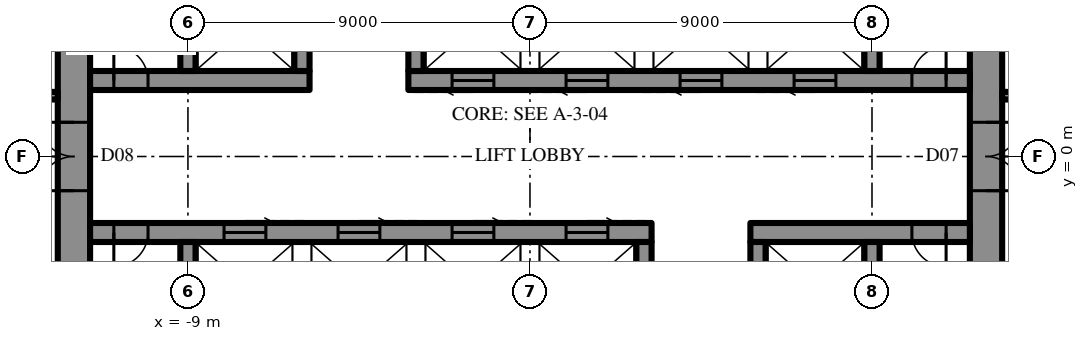
"""IFC4 building model, lengths in metres.
Left out: names, types, materials, properties, quantities, classifications, styles, units other than length and angle.
Written with IfcOpenShell. Run it as: python <this file> out.ifc"""

import sys

from ifc_helpers import new_model, si_unit, direction, frame, frame_2d, origin, place, context, subcontext, project, spatial, rectangle, extrude, element, fill, save


model = new_model("IFC4")
c1 = context("Model", 3, precision=1e-05, world=origin(), true_north=direction((0.0, 1.0)))
c2 = subcontext(c1, "Body", "Model", "MODEL_VIEW")
j1 = project(units=[si_unit("LENGTHUNIT", "METRE"), si_unit("PLANEANGLEUNIT", "RADIAN")], contexts=[c1])
p1 = place(None, origin())
s1 = spatial("IfcSite", under=j1, at=p1, CompositionType="ELEMENT")
p2 = place(p1, origin())
s2 = spatial("IfcBuilding", under=s1, at=p2, CompositionType="ELEMENT")
p3 = place(p2, frame((0.0, 0.0, 319.9)))
s3 = spatial("IfcBuildingStorey", under=s2, at=p3, CompositionType="ELEMENT", Elevation=319.9)
p4 = place(p3, frame((12.0, -10.7, 0.0), z_axis=(0.0, 0.0, 1.0), x_axis=(0.0, 1.0, 0.0)))
e1 = element("IfcWall", 1, at=p4, inside=s3, PredefinedType="SHEAR", context=c2, shape_type="SweptSolid", body=[
    extrude(rectangle(XDim=21.4, YDim=0.85, at=frame_2d((10.7, 0.0))), origin(), (0.0, 0.0, 1.0), 4.2),
])
p5 = place(p4, frame((9.8, 0.0, 0.0)))
e2 = element("IfcOpeningElement", 2, at=p5, cuts=e1, PredefinedType="OPENING", context=c2, shape_type="SweptSolid", body=[
    extrude(rectangle(XDim=1.8, YDim=2.4, at=frame_2d((0.9, 1.2))), frame((0.0, 0.435, 0.0), z_axis=(0.0, -1.0, 0.0), x_axis=(1.0, 0.0, 0.0)), (0.0, 0.0, 1.0), 0.87),
])
p6 = place(p3, frame((-12.0, 10.7, 0.0), z_axis=(0.0, 0.0, 1.0), x_axis=(0.0, -1.0, 0.0)))
e3 = element("IfcWall", 3, at=p6, inside=s3, PredefinedType="SHEAR", context=c2, shape_type="SweptSolid", body=[
    extrude(rectangle(XDim=21.4, YDim=0.85, at=frame_2d((10.7, 0.0))), origin(), (0.0, 0.0, 1.0), 4.2),
])
p7 = place(p6, frame((9.8, 0.0, 0.0)))
e4 = element("IfcOpeningElement", 4, at=p7, cuts=e3, PredefinedType="OPENING", context=c2, shape_type="SweptSolid", body=[
    extrude(rectangle(XDim=1.8, YDim=2.4, at=frame_2d((0.9, 1.2))), frame((0.0, 0.435, 0.0), z_axis=(0.0, -1.0, 0.0), x_axis=(1.0, 0.0, 0.0)), (0.0, 0.0, 1.0), 0.87),
])
p8 = place(p3, frame((-11.575, 2.0, 0.0), z_axis=(0.0, 0.0, 1.0), x_axis=(1.0, 0.0, 0.0)))
e5 = element("IfcWall", 5, at=p8, inside=s3, PredefinedType="SHEAR", context=c2, shape_type="SweptSolid", body=[
    extrude(rectangle(XDim=5.775, YDim=0.5, at=frame_2d((2.887, 0.0))), origin(), (0.0, 0.0, 1.0), 4.2),
])
p9 = place(p8, frame((0.625, 0.0, 0.0)))
e6 = element("IfcOpeningElement", 6, at=p9, cuts=e5, PredefinedType="OPENING", context=c2, shape_type="SweptSolid", body=[
    extrude(rectangle(XDim=0.9, YDim=2.2, at=frame_2d((0.45, 1.1))), frame((0.0, 0.26, 0.0), z_axis=(0.0, -1.0, 0.0), x_axis=(1.0, 0.0, 0.0)), (0.0, 0.0, 1.0), 0.52),
])
p10 = place(p3, frame((-3.2, 2.0, 0.0), z_axis=(0.0, 0.0, 1.0), x_axis=(1.0, 0.0, 0.0)))
e7 = element("IfcWall", 7, at=p10, inside=s3, PredefinedType="SHEAR", context=c2, shape_type="SweptSolid", body=[
    extrude(rectangle(XDim=14.775, YDim=0.5, at=frame_2d((7.387, 0.0))), origin(), (0.0, 0.0, 1.0), 4.2),
])
p11 = place(p10, frame((13.25, 0.0, 0.0)))
e8 = element("IfcOpeningElement", 8, at=p11, cuts=e7, PredefinedType="OPENING", context=c2, shape_type="SweptSolid", body=[
    extrude(rectangle(XDim=0.9, YDim=2.2, at=frame_2d((0.45, 1.1))), frame((0.0, 0.26, 0.0), z_axis=(0.0, -1.0, 0.0), x_axis=(1.0, 0.0, 0.0)), (0.0, 0.0, 1.0), 0.52),
])
p12 = place(p10, frame((1.15, 0.0, 0.0)))
e9 = element("IfcOpeningElement", 9, at=p12, cuts=e7, PredefinedType="OPENING", context=c2, shape_type="SweptSolid", body=[
    extrude(rectangle(XDim=1.1, YDim=2.2, at=frame_2d((0.55, 1.1))), frame((0.0, 0.26, 0.0), z_axis=(0.0, -1.0, 0.0), x_axis=(1.0, 0.0, 0.0)), (0.0, 0.0, 1.0), 0.52),
])
p13 = place(p10, frame((4.15, 0.0, 0.0)))
e10 = element("IfcOpeningElement", 10, at=p13, cuts=e7, PredefinedType="OPENING", context=c2, shape_type="SweptSolid", body=[
    extrude(rectangle(XDim=1.1, YDim=2.2, at=frame_2d((0.55, 1.1))), frame((0.0, 0.26, 0.0), z_axis=(0.0, -1.0, 0.0), x_axis=(1.0, 0.0, 0.0)), (0.0, 0.0, 1.0), 0.52),
])
p14 = place(p10, frame((7.15, 0.0, 0.0)))
e11 = element("IfcOpeningElement", 11, at=p14, cuts=e7, PredefinedType="OPENING", context=c2, shape_type="SweptSolid", body=[
    extrude(rectangle(XDim=1.1, YDim=2.2, at=frame_2d((0.55, 1.1))), frame((0.0, 0.26, 0.0), z_axis=(0.0, -1.0, 0.0), x_axis=(1.0, 0.0, 0.0)), (0.0, 0.0, 1.0), 0.52),
])
p15 = place(p10, frame((10.15, 0.0, 0.0)))
e12 = element("IfcOpeningElement", 12, at=p15, cuts=e7, PredefinedType="OPENING", context=c2, shape_type="SweptSolid", body=[
    extrude(rectangle(XDim=1.1, YDim=2.2, at=frame_2d((0.55, 1.1))), frame((0.0, 0.26, 0.0), z_axis=(0.0, -1.0, 0.0), x_axis=(1.0, 0.0, 0.0)), (0.0, 0.0, 1.0), 0.52),
])
for number, where, z_axis, x_axis in (
    (13, (-9.0, 2.25, 0.0), (0.0, 0.0, 1.0), (0.0, 1.0, 0.0)),
    (14, (-6.0, 2.25, 0.0), (0.0, 0.0, 1.0), (0.0, 1.0, 0.0)),
    (15, (-3.0, 2.25, 0.0), (0.0, 0.0, 1.0), (0.0, 1.0, 0.0)),
    (16, (9.0, 2.25, 0.0), (0.0, 0.0, 1.0), (0.0, 1.0, 0.0)),
):
    element("IfcWall", number, at=place(p3, frame(where, z_axis=z_axis, x_axis=x_axis)), inside=s3, PredefinedType="SHEAR", context=c2, shape_type="SweptSolid", body=[
        extrude(rectangle(XDim=2.3, YDim=0.4, at=frame_2d((1.15, 0.0))), origin(), (0.0, 0.0, 1.0), 4.2),
    ])
p16 = place(p3, frame((11.575, -2.0, 0.0), z_axis=(0.0, 0.0, 1.0), x_axis=(-1.0, 0.0, 0.0)))
e17 = element("IfcWall", 17, at=p16, inside=s3, PredefinedType="SHEAR", context=c2, shape_type="SweptSolid", body=[
    extrude(rectangle(XDim=5.775, YDim=0.5, at=frame_2d((2.887, 0.0))), origin(), (0.0, 0.0, 1.0), 4.2),
])
p17 = place(p16, frame((0.625, 0.0, 0.0)))
e18 = element("IfcOpeningElement", 18, at=p17, cuts=e17, PredefinedType="OPENING", context=c2, shape_type="SweptSolid", body=[
    extrude(rectangle(XDim=0.9, YDim=2.2, at=frame_2d((0.45, 1.1))), frame((0.0, 0.26, 0.0), z_axis=(0.0, -1.0, 0.0), x_axis=(1.0, 0.0, 0.0)), (0.0, 0.0, 1.0), 0.52),
])
p18 = place(p3, frame((3.2, -2.0, 0.0), z_axis=(0.0, 0.0, 1.0), x_axis=(-1.0, 0.0, 0.0)))
e19 = element("IfcWall", 19, at=p18, inside=s3, PredefinedType="SHEAR", context=c2, shape_type="SweptSolid", body=[
    extrude(rectangle(XDim=14.775, YDim=0.5, at=frame_2d((7.387, 0.0))), origin(), (0.0, 0.0, 1.0), 4.2),
])
p19 = place(p18, frame((13.25, 0.0, 0.0)))
e20 = element("IfcOpeningElement", 20, at=p19, cuts=e19, PredefinedType="OPENING", context=c2, shape_type="SweptSolid", body=[
    extrude(rectangle(XDim=0.9, YDim=2.2, at=frame_2d((0.45, 1.1))), frame((0.0, 0.26, 0.0), z_axis=(0.0, -1.0, 0.0), x_axis=(1.0, 0.0, 0.0)), (0.0, 0.0, 1.0), 0.52),
])
p20 = place(p18, frame((1.15, 0.0, 0.0)))
e21 = element("IfcOpeningElement", 21, at=p20, cuts=e19, PredefinedType="OPENING", context=c2, shape_type="SweptSolid", body=[
    extrude(rectangle(XDim=1.1, YDim=2.2, at=frame_2d((0.55, 1.1))), frame((0.0, 0.26, 0.0), z_axis=(0.0, -1.0, 0.0), x_axis=(1.0, 0.0, 0.0)), (0.0, 0.0, 1.0), 0.52),
])
p21 = place(p18, frame((4.15, 0.0, 0.0)))
e22 = element("IfcOpeningElement", 22, at=p21, cuts=e19, PredefinedType="OPENING", context=c2, shape_type="SweptSolid", body=[
    extrude(rectangle(XDim=1.1, YDim=2.2, at=frame_2d((0.55, 1.1))), frame((0.0, 0.26, 0.0), z_axis=(0.0, -1.0, 0.0), x_axis=(1.0, 0.0, 0.0)), (0.0, 0.0, 1.0), 0.52),
])
p22 = place(p18, frame((7.15, 0.0, 0.0)))
e23 = element("IfcOpeningElement", 23, at=p22, cuts=e19, PredefinedType="OPENING", context=c2, shape_type="SweptSolid", body=[
    extrude(rectangle(XDim=1.1, YDim=2.2, at=frame_2d((0.55, 1.1))), frame((0.0, 0.26, 0.0), z_axis=(0.0, -1.0, 0.0), x_axis=(1.0, 0.0, 0.0)), (0.0, 0.0, 1.0), 0.52),
])
p23 = place(p18, frame((10.15, 0.0, 0.0)))
e24 = element("IfcOpeningElement", 24, at=p23, cuts=e19, PredefinedType="OPENING", context=c2, shape_type="SweptSolid", body=[
    extrude(rectangle(XDim=1.1, YDim=2.2, at=frame_2d((0.55, 1.1))), frame((0.0, 0.26, 0.0), z_axis=(0.0, -1.0, 0.0), x_axis=(1.0, 0.0, 0.0)), (0.0, 0.0, 1.0), 0.52),
])
for number, where, z_axis, x_axis in (
    (25, (9.0, -2.25, 0.0), (0.0, 0.0, 1.0), (0.0, -1.0, 0.0)),
    (26, (6.0, -2.25, 0.0), (0.0, 0.0, 1.0), (0.0, -1.0, 0.0)),
    (27, (3.0, -2.25, 0.0), (0.0, 0.0, 1.0), (0.0, -1.0, 0.0)),
    (28, (-9.0, -2.25, 0.0), (0.0, 0.0, 1.0), (0.0, -1.0, 0.0)),
):
    element("IfcWall", number, at=place(p3, frame(where, z_axis=z_axis, x_axis=x_axis)), inside=s3, PredefinedType="SHEAR", context=c2, shape_type="SweptSolid", body=[
        extrude(rectangle(XDim=2.3, YDim=0.4, at=frame_2d((1.15, 0.0))), origin(), (0.0, 0.0, 1.0), 4.2),
    ])
p24 = place(p3, frame((12.425, 1.6, 0.0), z_axis=(0.0, 0.0, 1.0), x_axis=(1.0, 0.0, 0.0)))
e29 = element("IfcWall", 29, at=p24, inside=s3, PredefinedType="PARTITIONING", context=c2, shape_type="SweptSolid", body=[
    extrude(rectangle(XDim=16.327, YDim=0.2, at=frame_2d((8.164, 0.0))), origin(), (0.0, 0.0, 1.0), 4.0),
])
p25 = place(p24, frame((1.133, 0.0, 0.0)))
e30 = element("IfcOpeningElement", 30, at=p25, cuts=e29, PredefinedType="OPENING", context=c2, shape_type="SweptSolid", body=[
    extrude(rectangle(XDim=1.0, YDim=2.2, at=frame_2d((0.5, 1.1))), frame((0.0, 0.11, 0.0), z_axis=(0.0, -1.0, 0.0), x_axis=(1.0, 0.0, 0.0)), (0.0, 0.0, 1.0), 0.22),
])
p26 = place(p3, frame((-12.425, 1.6, 0.0), z_axis=(0.0, 0.0, 1.0), x_axis=(-1.0, 0.0, 0.0)))
e31 = element("IfcWall", 31, at=p26, inside=s3, PredefinedType="PARTITIONING", context=c2, shape_type="SweptSolid", body=[
    extrude(rectangle(XDim=16.327, YDim=0.2, at=frame_2d((8.164, 0.0))), origin(), (0.0, 0.0, 1.0), 4.0),
])
p27 = place(p26, frame((1.133, 0.0, 0.0)))
e32 = element("IfcOpeningElement", 32, at=p27, cuts=e31, PredefinedType="OPENING", context=c2, shape_type="SweptSolid", body=[
    extrude(rectangle(XDim=1.0, YDim=2.2, at=frame_2d((0.5, 1.1))), frame((0.0, 0.11, 0.0), z_axis=(0.0, -1.0, 0.0), x_axis=(1.0, 0.0, 0.0)), (0.0, 0.0, 1.0), 0.22),
])
p28 = place(p5, frame((1.8, 0.0, 0.0), z_axis=(0.0, 0.0, 1.0), x_axis=(-1.0, 0.0, 0.0)))
e33 = element("IfcDoor", 33, at=p28, inside=s3, OperationType="DOUBLE_DOOR_SINGLE_SWING", PredefinedType="DOOR", context=c2, shape_type="SweptSolid", body=[
    extrude(rectangle(XDim=1.8, YDim=2.4, at=frame_2d((0.9, 1.2))), frame((0.0, 0.025, 0.0), z_axis=(0.0, -1.0, 0.0), x_axis=(1.0, 0.0, 0.0)), (0.0, 0.0, 1.0), 0.05),
])
fill(e2, e33)
p29 = place(p7, frame((1.8, 0.0, 0.0), z_axis=(0.0, 0.0, 1.0), x_axis=(-1.0, 0.0, 0.0)))
e34 = element("IfcDoor", 34, at=p29, inside=s3, OperationType="DOUBLE_DOOR_SINGLE_SWING", PredefinedType="DOOR", context=c2, shape_type="SweptSolid", body=[
    extrude(rectangle(XDim=1.8, YDim=2.4, at=frame_2d((0.9, 1.2))), frame((0.0, 0.025, 0.0), z_axis=(0.0, -1.0, 0.0), x_axis=(1.0, 0.0, 0.0)), (0.0, 0.0, 1.0), 0.05),
])
fill(e4, e34)
p30 = place(p9, origin())
e35 = element("IfcDoor", 35, at=p30, inside=s3, OperationType="SINGLE_SWING_RIGHT", PredefinedType="DOOR", context=c2, shape_type="SweptSolid", body=[
    extrude(rectangle(XDim=0.9, YDim=2.2, at=frame_2d((0.45, 1.1))), frame((0.0, 0.025, 0.0), z_axis=(0.0, -1.0, 0.0), x_axis=(1.0, 0.0, 0.0)), (0.0, 0.0, 1.0), 0.05),
])
fill(e6, e35)
p31 = place(p11, origin())
e36 = element("IfcDoor", 36, at=p31, inside=s3, OperationType="SINGLE_SWING_LEFT", PredefinedType="DOOR", context=c2, shape_type="SweptSolid", body=[
    extrude(rectangle(XDim=0.9, YDim=2.2, at=frame_2d((0.45, 1.1))), frame((0.0, 0.025, 0.0), z_axis=(0.0, -1.0, 0.0), x_axis=(1.0, 0.0, 0.0)), (0.0, 0.0, 1.0), 0.05),
])
fill(e8, e36)
p32 = place(p17, origin())
e37 = element("IfcDoor", 37, at=p32, inside=s3, OperationType="SINGLE_SWING_RIGHT", PredefinedType="DOOR", context=c2, shape_type="SweptSolid", body=[
    extrude(rectangle(XDim=0.9, YDim=2.2, at=frame_2d((0.45, 1.1))), frame((0.0, 0.025, 0.0), z_axis=(0.0, -1.0, 0.0), x_axis=(1.0, 0.0, 0.0)), (0.0, 0.0, 1.0), 0.05),
])
fill(e18, e37)
p33 = place(p19, origin())
e38 = element("IfcDoor", 38, at=p33, inside=s3, OperationType="SINGLE_SWING_LEFT", PredefinedType="DOOR", context=c2, shape_type="SweptSolid", body=[
    extrude(rectangle(XDim=0.9, YDim=2.2, at=frame_2d((0.45, 1.1))), frame((0.0, 0.025, 0.0), z_axis=(0.0, -1.0, 0.0), x_axis=(1.0, 0.0, 0.0)), (0.0, 0.0, 1.0), 0.05),
])
fill(e20, e38)
p34 = place(p12, frame((1.1, 0.0, 0.0), z_axis=(0.0, 0.0, 1.0), x_axis=(-1.0, 0.0, 0.0)))
e39 = element("IfcDoor", 39, at=p34, inside=s3, OperationType="SLIDING_TO_LEFT", PredefinedType="DOOR", context=c2, shape_type="SweptSolid", body=[
    extrude(rectangle(XDim=1.1, YDim=2.2, at=frame_2d((0.55, 1.1))), frame((0.0, 0.025, 0.0), z_axis=(0.0, -1.0, 0.0), x_axis=(1.0, 0.0, 0.0)), (0.0, 0.0, 1.0), 0.05),
])
fill(e9, e39)
p35 = place(p13, frame((1.1, 0.0, 0.0), z_axis=(0.0, 0.0, 1.0), x_axis=(-1.0, 0.0, 0.0)))
e40 = element("IfcDoor", 40, at=p35, inside=s3, OperationType="SLIDING_TO_LEFT", PredefinedType="DOOR", context=c2, shape_type="SweptSolid", body=[
    extrude(rectangle(XDim=1.1, YDim=2.2, at=frame_2d((0.55, 1.1))), frame((0.0, 0.025, 0.0), z_axis=(0.0, -1.0, 0.0), x_axis=(1.0, 0.0, 0.0)), (0.0, 0.0, 1.0), 0.05),
])
fill(e10, e40)
p36 = place(p14, frame((1.1, 0.0, 0.0), z_axis=(0.0, 0.0, 1.0), x_axis=(-1.0, 0.0, 0.0)))
e41 = element("IfcDoor", 41, at=p36, inside=s3, OperationType="SLIDING_TO_LEFT", PredefinedType="DOOR", context=c2, shape_type="SweptSolid", body=[
    extrude(rectangle(XDim=1.1, YDim=2.2, at=frame_2d((0.55, 1.1))), frame((0.0, 0.025, 0.0), z_axis=(0.0, -1.0, 0.0), x_axis=(1.0, 0.0, 0.0)), (0.0, 0.0, 1.0), 0.05),
])
fill(e11, e41)
p37 = place(p15, frame((1.1, 0.0, 0.0), z_axis=(0.0, 0.0, 1.0), x_axis=(-1.0, 0.0, 0.0)))
e42 = element("IfcDoor", 42, at=p37, inside=s3, OperationType="SLIDING_TO_LEFT", PredefinedType="DOOR", context=c2, shape_type="SweptSolid", body=[
    extrude(rectangle(XDim=1.1, YDim=2.2, at=frame_2d((0.55, 1.1))), frame((0.0, 0.025, 0.0), z_axis=(0.0, -1.0, 0.0), x_axis=(1.0, 0.0, 0.0)), (0.0, 0.0, 1.0), 0.05),
])
fill(e12, e42)
p38 = place(p20, frame((1.1, 0.0, 0.0), z_axis=(0.0, 0.0, 1.0), x_axis=(-1.0, 0.0, 0.0)))
e43 = element("IfcDoor", 43, at=p38, inside=s3, OperationType="SLIDING_TO_LEFT", PredefinedType="DOOR", context=c2, shape_type="SweptSolid", body=[
    extrude(rectangle(XDim=1.1, YDim=2.2, at=frame_2d((0.55, 1.1))), frame((0.0, 0.025, 0.0), z_axis=(0.0, -1.0, 0.0), x_axis=(1.0, 0.0, 0.0)), (0.0, 0.0, 1.0), 0.05),
])
fill(e21, e43)
p39 = place(p21, frame((1.1, 0.0, 0.0), z_axis=(0.0, 0.0, 1.0), x_axis=(-1.0, 0.0, 0.0)))
e44 = element("IfcDoor", 44, at=p39, inside=s3, OperationType="SLIDING_TO_LEFT", PredefinedType="DOOR", context=c2, shape_type="SweptSolid", body=[
    extrude(rectangle(XDim=1.1, YDim=2.2, at=frame_2d((0.55, 1.1))), frame((0.0, 0.025, 0.0), z_axis=(0.0, -1.0, 0.0), x_axis=(1.0, 0.0, 0.0)), (0.0, 0.0, 1.0), 0.05),
])
fill(e22, e44)
p40 = place(p22, frame((1.1, 0.0, 0.0), z_axis=(0.0, 0.0, 1.0), x_axis=(-1.0, 0.0, 0.0)))
e45 = element("IfcDoor", 45, at=p40, inside=s3, OperationType="SLIDING_TO_LEFT", PredefinedType="DOOR", context=c2, shape_type="SweptSolid", body=[
    extrude(rectangle(XDim=1.1, YDim=2.2, at=frame_2d((0.55, 1.1))), frame((0.0, 0.025, 0.0), z_axis=(0.0, -1.0, 0.0), x_axis=(1.0, 0.0, 0.0)), (0.0, 0.0, 1.0), 0.05),
])
fill(e23, e45)
p41 = place(p23, frame((1.1, 0.0, 0.0), z_axis=(0.0, 0.0, 1.0), x_axis=(-1.0, 0.0, 0.0)))
e46 = element("IfcDoor", 46, at=p41, inside=s3, OperationType="SLIDING_TO_LEFT", PredefinedType="DOOR", context=c2, shape_type="SweptSolid", body=[
    extrude(rectangle(XDim=1.1, YDim=2.2, at=frame_2d((0.55, 1.1))), frame((0.0, 0.025, 0.0), z_axis=(0.0, -1.0, 0.0), x_axis=(1.0, 0.0, 0.0)), (0.0, 0.0, 1.0), 0.05),
])
fill(e24, e46)
save(model, sys.argv[1])
